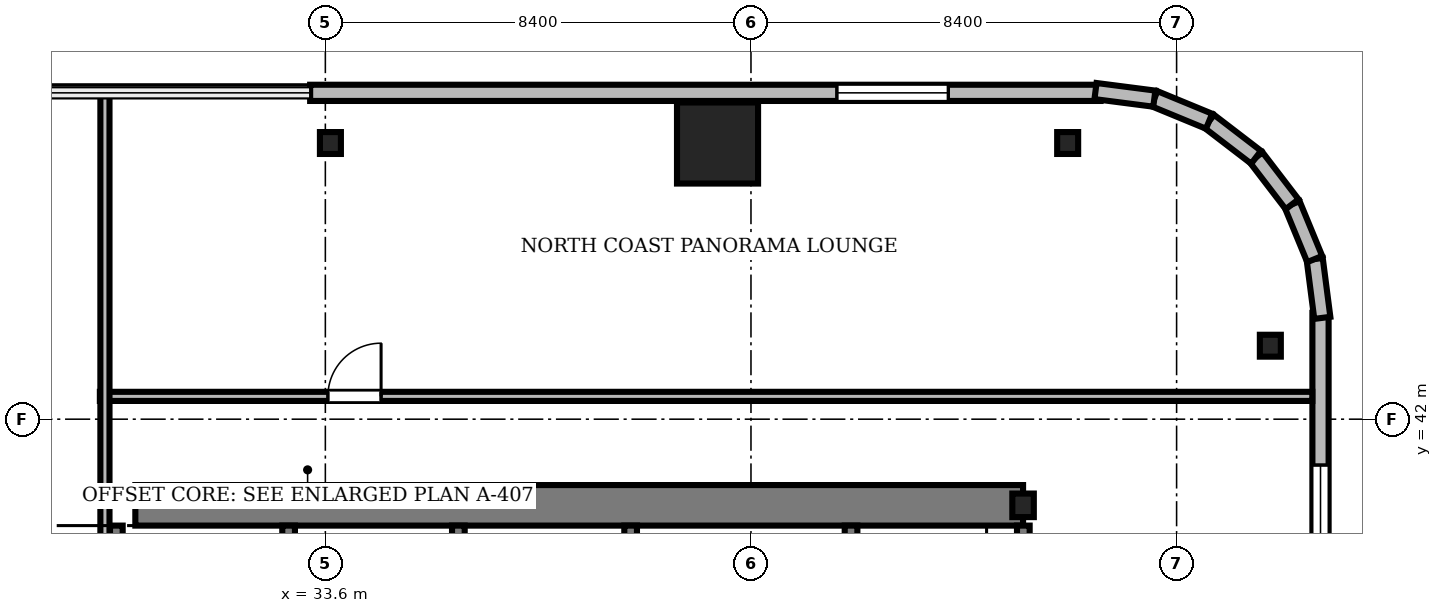
"""IFC4 building model, lengths in metres.
Left out: names, types, materials, properties, quantities, classifications, styles, units other than length and angle.
Written with IfcOpenShell. Run it as: python <this file> out.ifc"""

import sys

from ifc_helpers import new_model, si_unit, direction, frame, frame_2d, origin, origin_2d, place, context, subcontext, project, spatial, rectangle, i_section, extrude, source, transform, mapped, element, fill, save


model = new_model("IFC4")
c1 = context("Model", 3, precision=1e-05, world=origin(), true_north=direction((0.0, 1.0)))
c2 = subcontext(c1, "Body", "Model", "MODEL_VIEW")
j1 = project(units=[si_unit("LENGTHUNIT", "METRE"), si_unit("PLANEANGLEUNIT", "RADIAN")], contexts=[c1])
p1 = place(None, origin())
s1 = spatial("IfcSite", under=j1, at=p1, CompositionType="ELEMENT")
p2 = place(p1, origin())
s2 = spatial("IfcBuilding", under=s1, at=p2, CompositionType="ELEMENT")
p3 = place(p2, frame((0.0, 0.0, 137.2)))
s3 = spatial("IfcBuildingStorey", under=s2, at=p3, CompositionType="ELEMENT", Elevation=137.2)
m1 = source(origin(), c2, "Body", "SweptSolid", [
    extrude(rectangle(XDim=17.52, YDim=0.8, at=frame_2d((8.76, 0.0))), origin(), (0.0, 0.0, 1.0), 3.46),
])
p4 = place(p3, frame((29.85, 40.3, 0.0), z_axis=(0.0, 0.0, 1.0), x_axis=(1.0, 0.0, 0.0)))
e1 = element("IfcWall", 1, at=p4, inside=s3, PredefinedType="SHEAR", context=c2, shape_type="MappedRepresentation", body=[
    mapped(m1, transform((0.0, 0.0, 0.0), scale=1.0)),
])
m2 = source(origin(), c2, "Body", "SweptSolid", [
    extrude(i_section(OverallWidth=0.424, OverallDepth=0.465, WebThickness=0.035, FlangeThickness=0.056, FilletRadius=0.015, at=origin_2d()), origin(), (0.0, 0.0, 1.0), 3.46),
])
p5 = place(p3, frame((47.37, 40.3, 0.0), z_axis=(0.0, 0.0, 1.0), x_axis=(1.0, 0.0, 0.0)))
e2 = element("IfcColumn", 2, at=p5, inside=s3, PredefinedType="COLUMN", context=c2, shape_type="MappedRepresentation", body=[
    mapped(m2, transform((0.0, 0.0, 0.0), scale=1.0)),
])
m3 = source(origin(), c2, "Body", "SweptSolid", [
    extrude(rectangle(XDim=1.6, YDim=1.6, at=origin_2d()), origin(), (0.0, 0.0, 1.0), 3.46),
])
p6 = place(p3, frame((41.34, 47.45, 0.0), z_axis=(0.0, 0.0, 1.0), x_axis=(1.0, 0.0, 0.0)))
e3 = element("IfcColumn", 3, at=p6, inside=s3, PredefinedType="COLUMN", context=c2, shape_type="MappedRepresentation", body=[
    mapped(m3, transform((0.0, 0.0, 0.0), scale=1.0)),
])
m4 = source(origin(), c2, "Body", "SweptSolid", [
    extrude(i_section(OverallWidth=0.414, OverallDepth=0.432, WebThickness=0.026, FlangeThickness=0.04, FilletRadius=0.015, at=origin_2d()), origin(), (0.0, 0.0, 1.0), 3.46),
])
for number, where, z_axis, x_axis in (
    (4, (52.25, 43.45, 0.0), (0.0, 0.0, 1.0), (1.0, 0.0, 0.0)),
    (5, (48.25, 47.45, 0.0), (0.0, 0.0, 1.0), (1.0, 0.0, 0.0)),
    (6, (33.7, 47.45, 0.0), (0.0, 0.0, 1.0), (1.0, 0.0, 0.0)),
):
    element("IfcColumn", number, at=place(p3, frame(where, z_axis=z_axis, x_axis=x_axis)), inside=s3, PredefinedType="COLUMN", context=c2, shape_type="MappedRepresentation", body=[
        mapped(m4, transform((0.0, 0.0, 0.0), scale=1.0)),
    ])
m5 = source(origin(), c2, "Body", "SweptSolid", [
    extrude(rectangle(XDim=15.6, YDim=0.32, at=frame_2d((7.8, 0.0))), origin(), (0.0, 0.0, 1.0), 3.46),
])
p7 = place(p3, frame((48.9, 48.44, 0.0), z_axis=(0.0, 0.0, 1.0), x_axis=(-1.0, 0.0, 0.0)))
e7 = element("IfcWall", 7, at=p7, inside=s3, PredefinedType="SOLIDWALL", context=c2, shape_type="MappedRepresentation", body=[
    mapped(m5, transform((0.0, 0.0, 0.0), scale=1.0)),
])
m6 = source(origin(), c2, "Body", "SweptSolid", [
    extrude(rectangle(XDim=2.2, YDim=2.4, at=frame_2d((1.1, 1.2))), frame((0.0, 0.17, 0.0), z_axis=(0.0, -1.0, 0.0), x_axis=(1.0, 0.0, 0.0)), (0.0, 0.0, 1.0), 0.34),
])
p8 = place(p7, frame((3.005, 0.0, 0.72)))
e8 = element("IfcOpeningElement", 8, at=p8, cuts=e7, PredefinedType="OPENING", context=c2, shape_type="MappedRepresentation", body=[
    mapped(m6, transform((0.0, 0.0, 0.0), scale=1.0)),
])
m7 = source(origin(), c2, "Body", "SweptSolid", [
    extrude(rectangle(XDim=15.6, YDim=0.32, at=frame_2d((7.8, 0.0))), origin(), (0.0, 0.0, 1.0), 3.46),
])
p9 = place(p3, frame((53.24, 28.5, 0.0), z_axis=(0.0, 0.0, 1.0), x_axis=(0.0, 1.0, 0.0)))
e9 = element("IfcWall", 9, at=p9, inside=s3, PredefinedType="SOLIDWALL", context=c2, shape_type="MappedRepresentation", body=[
    mapped(m7, transform((0.0, 0.0, 0.0), scale=1.0)),
])
p10 = place(p9, frame((10.395, 0.0, 0.72)))
e10 = element("IfcOpeningElement", 10, at=p10, cuts=e9, PredefinedType="OPENING", context=c2, shape_type="MappedRepresentation", body=[
    mapped(m6, transform((0.0, 0.0, 0.0), scale=1.0)),
])
m8 = source(origin(), c2, "Body", "SweptSolid", [
    extrude(rectangle(XDim=1.17, YDim=0.32, at=frame_2d((0.585, 0.0))), origin(), (0.0, 0.0, 1.0), 3.46),
])
p11 = place(p3, frame((53.276, 44.0, 0.0), z_axis=(0.0, 0.0, 1.0), x_axis=(-0.128295670475, 0.991735963317, 0.0)))
e11 = element("IfcWall", 11, at=p11, inside=s3, PredefinedType="SOLIDWALL", context=c2, shape_type="MappedRepresentation", body=[
    mapped(m8, transform((0.0, 0.0, 0.0), scale=1.0)),
])
m9 = source(origin(), c2, "Body", "SweptSolid", [
    extrude(rectangle(XDim=1.169, YDim=0.32, at=frame_2d((0.584, 0.0))), origin(), (0.0, 0.0, 1.0), 3.46),
])
p12 = place(p3, frame((53.125, 45.16, 0.0), z_axis=(0.0, 0.0, 1.0), x_axis=(-0.381054331552, 0.924552646638, 0.0)))
e12 = element("IfcWall", 12, at=p12, inside=s3, PredefinedType="SOLIDWALL", context=c2, shape_type="MappedRepresentation", body=[
    mapped(m9, transform((0.0, 0.0, 0.0), scale=1.0)),
])
m10 = source(origin(), c2, "Body", "SweptSolid", [
    extrude(rectangle(XDim=1.169, YDim=0.32, at=frame_2d((0.584, 0.0))), origin(), (0.0, 0.0, 1.0), 3.46),
])
p13 = place(p3, frame((52.68, 46.241, 0.0), z_axis=(0.0, 0.0, 1.0), x_axis=(-0.608387696831, 0.793639975269, 0.0)))
e13 = element("IfcWall", 13, at=p13, inside=s3, PredefinedType="SOLIDWALL", context=c2, shape_type="MappedRepresentation", body=[
    mapped(m10, transform((0.0, 0.0, 0.0), scale=1.0)),
])
m11 = source(origin(), c2, "Body", "SweptSolid", [
    extrude(rectangle(XDim=1.169, YDim=0.32, at=frame_2d((0.584, 0.0))), origin(), (0.0, 0.0, 1.0), 3.46),
])
p14 = place(p3, frame((51.969, 47.169, 0.0), z_axis=(0.0, 0.0, 1.0), x_axis=(-0.793663520347, 0.608356981114, 0.0)))
e14 = element("IfcWall", 14, at=p14, inside=s3, PredefinedType="SOLIDWALL", context=c2, shape_type="MappedRepresentation", body=[
    mapped(m11, transform((0.0, 0.0, 0.0), scale=1.0)),
])
p15 = place(p3, frame((51.041, 47.88, 0.0), z_axis=(0.0, 0.0, 1.0), x_axis=(-0.924552646638, 0.381054331552, 0.0)))
e15 = element("IfcWall", 15, at=p15, inside=s3, PredefinedType="SOLIDWALL", context=c2, shape_type="MappedRepresentation", body=[
    mapped(m9, transform((0.0, 0.0, 0.0), scale=1.0)),
])
p16 = place(p3, frame((49.96, 48.325, 0.0), z_axis=(0.0, 0.0, 1.0), x_axis=(-0.991735963317, 0.128295670475, 0.0)))
e16 = element("IfcWall", 16, at=p16, inside=s3, PredefinedType="SOLIDWALL", context=c2, shape_type="MappedRepresentation", body=[
    mapped(m8, transform((0.0, 0.0, 0.0), scale=1.0)),
])
m12 = source(origin(), c2, "Body", "SweptSolid", [
    extrude(rectangle(XDim=9.25, YDim=0.25, at=frame_2d((4.625, 0.0))), origin(), (0.0, 0.0, 1.0), 3.5),
])
for number, where, z_axis, x_axis in (
    (17, (29.475, 30.65, 0.0), (0.0, 0.0, 1.0), (0.0, 1.0, 0.0)),
    (18, (32.875, 30.65, 0.0), (0.0, 0.0, 1.0), (0.0, 1.0, 0.0)),
    (19, (36.225, 30.65, 0.0), (0.0, 0.0, 1.0), (0.0, 1.0, 0.0)),
    (20, (39.625, 30.65, 0.0), (0.0, 0.0, 1.0), (0.0, 1.0, 0.0)),
    (21, (43.975, 30.65, 0.0), (0.0, 0.0, 1.0), (0.0, 1.0, 0.0)),
    (22, (47.375, 30.65, 0.0), (0.0, 0.0, 1.0), (0.0, 1.0, 0.0)),
):
    element("IfcWall", number, at=place(p3, frame(where, z_axis=z_axis, x_axis=x_axis)), inside=s3, PredefinedType="SOLIDWALL", context=c2, shape_type="MappedRepresentation", body=[
        mapped(m12, transform((0.0, 0.0, 0.0), scale=1.0)),
    ])
m13 = source(origin(), c2, "Body", "SweptSolid", [
    extrude(rectangle(XDim=23.928, YDim=0.18, at=frame_2d((11.964, 0.0))), origin(), (0.0, 0.0, 1.0), 2.702),
])
p17 = place(p3, frame((29.15, 42.45, 0.0), z_axis=(0.0, 0.0, 1.0), x_axis=(1.0, 0.0, 0.0)))
e23 = element("IfcWall", 23, at=p17, inside=s3, PredefinedType="PARTITIONING", context=c2, shape_type="MappedRepresentation", body=[
    mapped(m13, transform((0.0, 0.0, 0.0), scale=1.0)),
])
m14 = source(origin(), c2, "Body", "SweptSolid", [
    extrude(rectangle(XDim=1.05, YDim=2.2, at=frame_2d((0.525, 1.1))), frame((0.0, 0.1, 0.0), z_axis=(0.0, -1.0, 0.0), x_axis=(1.0, 0.0, 0.0)), (0.0, 0.0, 1.0), 0.2),
])
p18 = place(p17, frame((4.5, 0.0, 0.0)))
e24 = element("IfcOpeningElement", 24, at=p18, cuts=e23, PredefinedType="OPENING", context=c2, shape_type="MappedRepresentation", body=[
    mapped(m14, transform((0.0, 0.0, 0.0), scale=1.0)),
])
m15 = source(origin(), c2, "Body", "SweptSolid", [
    extrude(rectangle(XDim=11.45, YDim=0.18, at=frame_2d((5.725, 0.0))), origin(), (0.0, 0.0, 1.0), 2.702),
])
p19 = place(p3, frame((29.25, 37.02, 0.0), z_axis=(0.0, 0.0, 1.0), x_axis=(0.0, 1.0, 0.0)))
e25 = element("IfcWall", 25, at=p19, inside=s3, PredefinedType="PARTITIONING", context=c2, shape_type="MappedRepresentation", body=[
    mapped(m15, transform((0.0, 0.0, 0.0), scale=1.0)),
])
m16 = source(origin(), c2, "Body", "SweptSolid", [
    extrude(rectangle(XDim=2.2, YDim=2.4, at=frame_2d((1.1, 1.2))), frame((0.0, 0.03, 0.0), z_axis=(0.0, -1.0, 0.0), x_axis=(1.0, 0.0, 0.0)), (0.0, 0.0, 1.0), 0.06),
])
p20 = place(p8, origin())
e26 = element("IfcWindow", 26, at=p20, inside=s3, PartitioningType="SINGLE_PANEL", PredefinedType="WINDOW", context=c2, shape_type="MappedRepresentation", body=[
    mapped(m16, transform((0.0, 0.0, 0.0), scale=1.0)),
])
fill(e8, e26)
p21 = place(p10, origin())
e27 = element("IfcWindow", 27, at=p21, inside=s3, PartitioningType="SINGLE_PANEL", PredefinedType="WINDOW", context=c2, shape_type="MappedRepresentation", body=[
    mapped(m16, transform((0.0, 0.0, 0.0), scale=1.0)),
])
fill(e10, e27)
m17 = source(origin(), c2, "Body", "SweptSolid", [
    extrude(rectangle(XDim=1.05, YDim=2.2, at=frame_2d((0.525, 1.1))), frame((0.0, 0.025, 0.0), z_axis=(0.0, -1.0, 0.0), x_axis=(1.0, 0.0, 0.0)), (0.0, 0.0, 1.0), 0.05),
])
p22 = place(p18, origin())
e28 = element("IfcDoor", 28, at=p22, inside=s3, OperationType="SINGLE_SWING_RIGHT", PredefinedType="DOOR", context=c2, shape_type="MappedRepresentation", body=[
    mapped(m17, transform((0.0, 0.0, 0.0), scale=1.0)),
])
fill(e24, e28)
save(model, sys.argv[1])
